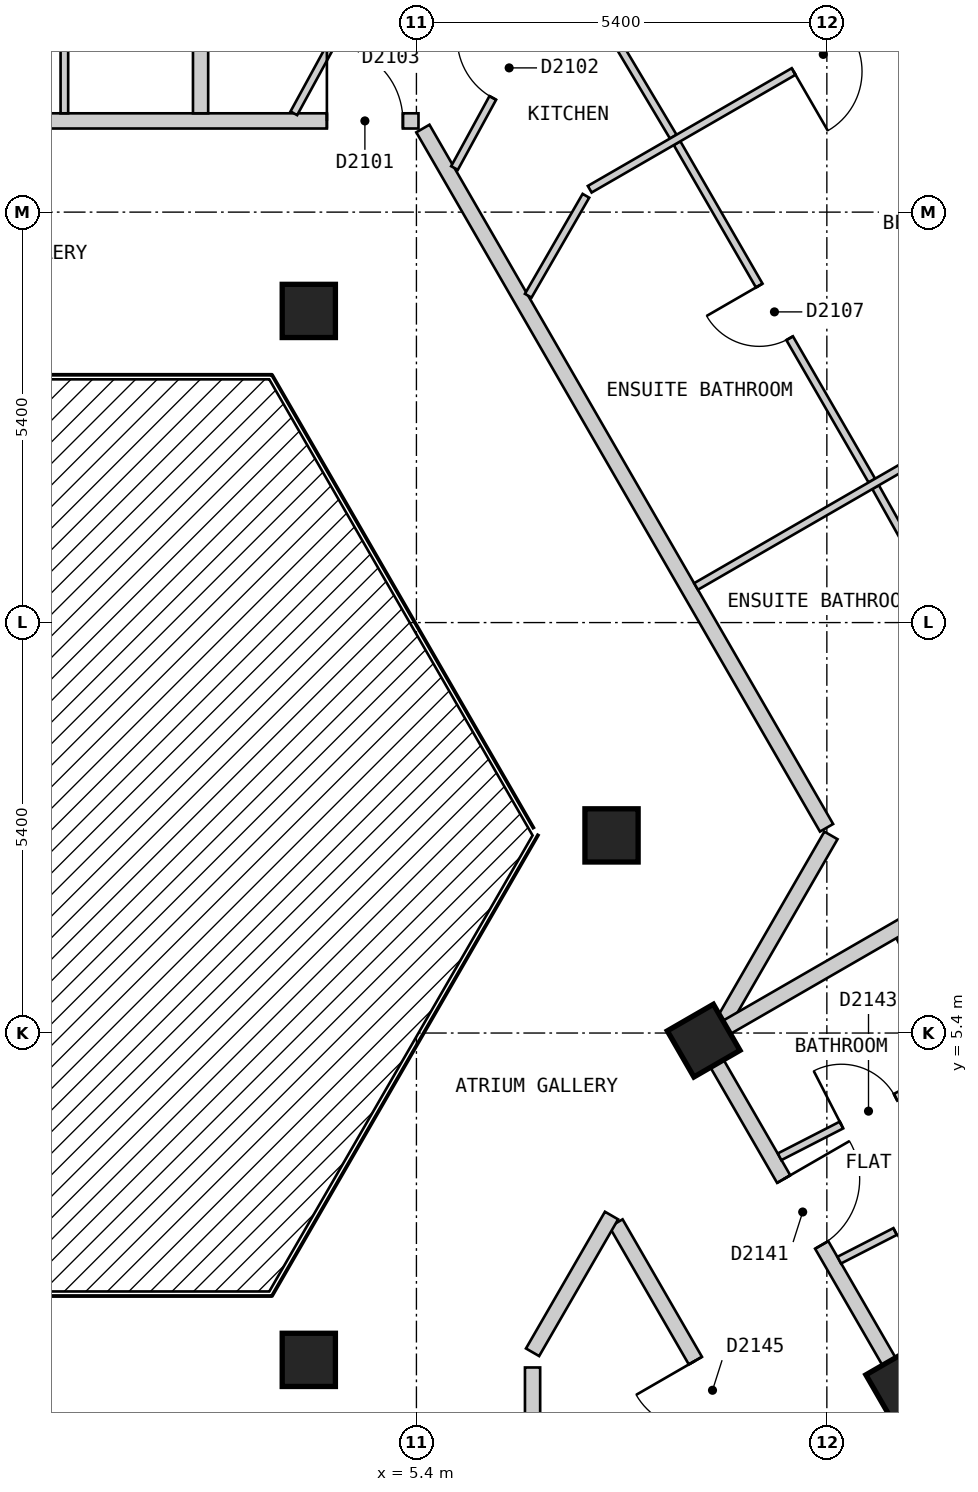
"""IFC4 building model, lengths in metres.
Left out: names, types, materials, properties, quantities, classifications, styles, units other than length and angle.
Written with IfcOpenShell. Run it as: python <this file> out.ifc"""

import sys

from ifc_helpers import new_model, si_unit, direction, frame, frame_2d, origin, origin_2d, place, context, subcontext, project, spatial, rectangle, extrude, element, fill, save


model = new_model("IFC4")
c1 = context("Model", 3, precision=1e-05, world=origin(), true_north=direction((0.0, 1.0)))
c2 = subcontext(c1, "Body", "Model", "MODEL_VIEW")
j1 = project(units=[si_unit("LENGTHUNIT", "METRE"), si_unit("PLANEANGLEUNIT", "RADIAN")], contexts=[c1])
p1 = place(None, origin())
s1 = spatial("IfcSite", under=j1, at=p1, CompositionType="ELEMENT")
p2 = place(p1, origin())
s2 = spatial("IfcBuilding", under=s1, at=p2, CompositionType="ELEMENT")
p3 = place(p2, frame((0.0, 0.0, 211.8)))
s3 = spatial("IfcBuildingStorey", under=s2, at=p3, CompositionType="ELEMENT", Elevation=211.8)
for number, where, z_axis, x_axis in (
    (1, (11.792, 0.775, 0.0), (0.0, 0.0, 1.0), (-0.5, 0.866, 0.0)),
    (2, (3.984, 1.1, 0.0), (0.0, 0.0, 1.0), (1.0, 0.0, 0.0)),
    (3, (9.179, 5.3, 0.0), (0.0, 0.0, 1.0), (-0.5, 0.866, 0.0)),
    (4, (7.967, 8.0, 0.0), (0.0, 0.0, 1.0), (1.0, 0.0, 0.0)),
    (5, (3.984, 14.9, 0.0), (0.0, 0.0, 1.0), (1.0, 0.0, 0.0)),
):
    element("IfcColumn", number, at=place(p3, frame(where, z_axis=z_axis, x_axis=x_axis)), inside=s3, PredefinedType="COLUMN", context=c2, shape_type="SweptSolid", body=[
        extrude(rectangle(XDim=0.7, YDim=0.7, at=origin_2d()), origin(), (0.0, 0.0, 1.0), 3.0),
    ])
p4 = place(p3, frame((8.026, 2.899, 0.0), z_axis=(0.0, 0.0, 1.0), x_axis=(0.499986018985, -0.866033475577, 0.0)))
e6 = element("IfcWall", 6, at=p4, inside=s3, PredefinedType="PARTITIONING", context=c2, shape_type="SweptSolid", body=[
    extrude(rectangle(XDim=5.078, YDim=0.2, at=frame_2d((2.539, 0.0))), origin(), (0.0, 0.0, 1.0), 2.7),
])
p5 = place(p4, frame((2.089, 0.0, 0.0)))
e7 = element("IfcOpeningElement", 7, at=p5, cuts=e6, PredefinedType="OPENING", context=c2, shape_type="SweptSolid", body=[
    extrude(rectangle(XDim=0.9, YDim=2.1, at=frame_2d((0.45, 1.05))), frame((0.0, 0.11, 0.0), z_axis=(0.0, -1.0, 0.0), x_axis=(1.0, 0.0, 0.0)), (0.0, 0.0, 1.0), 0.22),
])
p6 = place(p3, frame((9.238, 5.2, 0.0), z_axis=(0.0, 0.0, 1.0), x_axis=(0.500025705601, -0.86601056214, 0.0)))
e8 = element("IfcWall", 8, at=p6, inside=s3, PredefinedType="PARTITIONING", context=c2, shape_type="SweptSolid", body=[
    extrude(rectangle(XDim=7.735, YDim=0.2, at=frame_2d((3.868, 0.0))), origin(), (0.0, 0.0, 1.0), 2.7),
])
p7 = place(p6, frame((6.705, 0.0, 0.0)))
e9 = element("IfcOpeningElement", 9, at=p7, cuts=e8, PredefinedType="OPENING", context=c2, shape_type="SweptSolid", body=[
    extrude(rectangle(XDim=1.0, YDim=2.1, at=frame_2d((0.5, 1.05))), frame((0.0, 0.11, 0.0), z_axis=(0.0, -1.0, 0.0), x_axis=(1.0, 0.0, 0.0)), (0.0, 0.0, 1.0), 0.22),
])
p8 = place(p6, frame((1.988, 0.0, 0.0)))
e10 = element("IfcOpeningElement", 10, at=p8, cuts=e8, PredefinedType="OPENING", context=c2, shape_type="SweptSolid", body=[
    extrude(rectangle(XDim=1.0, YDim=2.1, at=frame_2d((0.5, 1.05))), frame((0.0, 0.11, 0.0), z_axis=(0.0, -1.0, 0.0), x_axis=(1.0, 0.0, 0.0)), (0.0, 0.0, 1.0), 0.22),
])
p9 = place(p3, frame((5.485, 17.3, 0.0), z_axis=(0.0, 0.0, 1.0), x_axis=(0.499943285704, -0.866058145322, 0.0)))
e11 = element("IfcWall", 11, at=p9, inside=s3, PredefinedType="PARTITIONING", context=c2, shape_type="SweptSolid", body=[
    extrude(rectangle(XDim=10.623, YDim=0.2, at=frame_2d((5.312, 0.0))), origin(), (0.0, 0.0, 1.0), 2.7),
])
p10 = place(p3, frame((6.928, 1.0, 0.0), z_axis=(0.0, 0.0, 1.0), x_axis=(0.0, -1.0, 0.0)))
e12 = element("IfcWall", 12, at=p10, inside=s3, PredefinedType="PARTITIONING", context=c2, shape_type="SweptSolid", body=[
    extrude(rectangle(XDim=3.699, YDim=0.2, at=frame_2d((1.85, 0.0))), origin(), (0.0, 0.0, 1.0), 2.7),
])
p11 = place(p3, frame((-5.312, 17.4, 0.0), z_axis=(0.0, 0.0, 1.0), x_axis=(1.0, 0.0, 0.0)))
e13 = element("IfcWall", 13, at=p11, inside=s3, PredefinedType="PARTITIONING", context=c2, shape_type="SweptSolid", body=[
    extrude(rectangle(XDim=10.739, YDim=0.2, at=frame_2d((5.37, 0.0))), origin(), (0.0, 0.0, 1.0), 2.7),
])
p12 = place(p11, frame((9.534, 0.0, 0.0)))
e14 = element("IfcOpeningElement", 14, at=p12, cuts=e13, PredefinedType="OPENING", context=c2, shape_type="SweptSolid", body=[
    extrude(rectangle(XDim=1.0, YDim=2.1, at=frame_2d((0.5, 1.05))), frame((0.0, 0.11, 0.0), z_axis=(0.0, -1.0, 0.0), x_axis=(1.0, 0.0, 0.0)), (0.0, 0.0, 1.0), 0.22),
])
p13 = place(p11, frame((4.812, 0.0, 0.0)))
e15 = element("IfcOpeningElement", 15, at=p13, cuts=e13, PredefinedType="OPENING", context=c2, shape_type="SweptSolid", body=[
    extrude(rectangle(XDim=1.0, YDim=2.1, at=frame_2d((0.5, 1.05))), frame((0.0, 0.11, 0.0), z_axis=(0.0, -1.0, 0.0), x_axis=(1.0, 0.0, 0.0)), (0.0, 0.0, 1.0), 0.22),
])
p14 = place(p3, frame((6.928, 1.2, 0.0), z_axis=(0.0, 0.0, 1.0), x_axis=(0.500132712588, 0.865948768577, 0.0)))
e16 = element("IfcWall", 16, at=p14, inside=s3, PredefinedType="PARTITIONING", context=c2, shape_type="SweptSolid", body=[
    extrude(rectangle(XDim=2.078, YDim=0.2, at=frame_2d((1.039, 0.0))), origin(), (0.0, 0.0, 1.0), 2.7),
])
p15 = place(p3, frame((9.454, 5.574, 0.0), z_axis=(0.0, 0.0, 1.0), x_axis=(0.499795394297, 0.86614350072, 0.0)))
e17 = element("IfcWall", 17, at=p15, inside=s3, PredefinedType="PARTITIONING", context=c2, shape_type="SweptSolid", body=[
    extrude(rectangle(XDim=2.801, YDim=0.2, at=frame_2d((1.4, 0.0))), origin(), (0.0, 0.0, 1.0), 2.7),
])
p16 = place(p3, frame((7.414, 19.484, 0.0), z_axis=(0.0, 0.0, 1.0), x_axis=(0.511881371655, -0.859056145634, 0.0)))
e18 = element("IfcWall", 18, at=p16, inside=s3, PredefinedType="PARTITIONING", context=c2, shape_type="SweptSolid", body=[
    extrude(rectangle(XDim=2.667, YDim=0.1, at=frame_2d((1.333, 0.0))), origin(), (0.0, 0.0, 1.0), 2.7),
])
p17 = place(p3, frame((8.829, 17.107, 0.0), z_axis=(0.0, 0.0, 1.0), x_axis=(0.500022055211, -0.866012669828, 0.0)))
e19 = element("IfcWall", 19, at=p17, inside=s3, PredefinedType="PARTITIONING", context=c2, shape_type="SweptSolid", body=[
    extrude(rectangle(XDim=5.126, YDim=0.1, at=frame_2d((2.563, 0.0))), origin(), (0.0, 0.0, 1.0), 2.7),
])
p18 = place(p17, frame((2.163, 0.0, 0.0)))
e20 = element("IfcOpeningElement", 20, at=p18, cuts=e19, PredefinedType="OPENING", context=c2, shape_type="SweptSolid", body=[
    extrude(rectangle(XDim=0.8, YDim=2.1, at=frame_2d((0.4, 1.05))), frame((0.0, 0.06, 0.0), z_axis=(0.0, -1.0, 0.0), x_axis=(1.0, 0.0, 0.0)), (0.0, 0.0, 1.0), 0.12),
])
p19 = place(p3, frame((11.441, 12.582, 0.0), z_axis=(0.0, 0.0, 1.0), x_axis=(0.488568218554, -0.872525699231, 0.0)))
e21 = element("IfcWall", 21, at=p19, inside=s3, PredefinedType="PARTITIONING", context=c2, shape_type="SweptSolid", body=[
    extrude(rectangle(XDim=5.076, YDim=0.1, at=frame_2d((2.538, 0.0))), origin(), (0.0, 0.0, 1.0), 2.7),
])
p20 = place(p19, frame((2.163, 0.0, 0.0)))
e22 = element("IfcOpeningElement", 22, at=p20, cuts=e21, PredefinedType="OPENING", context=c2, shape_type="SweptSolid", body=[
    extrude(rectangle(XDim=0.8, YDim=2.1, at=frame_2d((0.4, 1.05))), frame((0.0, 0.06, 0.0), z_axis=(0.0, -1.0, 0.0), x_axis=(1.0, 0.0, 0.0)), (0.0, 0.0, 1.0), 0.12),
])
p21 = place(p3, frame((11.772, 6.646, 0.0), z_axis=(0.0, 0.0, 1.0), x_axis=(0.456175983405, -0.889889584254, 0.0)))
e23 = element("IfcWall", 23, at=p21, inside=s3, PredefinedType="PARTITIONING", context=c2, shape_type="SweptSolid", body=[
    extrude(rectangle(XDim=3.348, YDim=0.1, at=frame_2d((1.674, 0.0))), origin(), (0.0, 0.0, 1.0), 2.7),
])
p22 = place(p3, frame((6.871, 15.1, 0.0), z_axis=(0.0, 0.0, 1.0), x_axis=(0.499805980977, 0.866137391745, 0.0)))
e24 = element("IfcWall", 24, at=p22, inside=s3, PredefinedType="PARTITIONING", context=c2, shape_type="SweptSolid", body=[
    extrude(rectangle(XDim=1.518, YDim=0.1, at=frame_2d((0.759, 0.0))), origin(), (0.0, 0.0, 1.0), 2.7),
])
p23 = place(p3, frame((3.787, 17.5, 0.0), z_axis=(0.0, 0.0, 1.0), x_axis=(0.479146828267, 0.877734764585, 0.0)))
e25 = element("IfcWall", 25, at=p23, inside=s3, PredefinedType="PARTITIONING", context=c2, shape_type="SweptSolid", body=[
    extrude(rectangle(XDim=3.076, YDim=0.1, at=frame_2d((1.538, 0.0))), origin(), (0.0, 0.0, 1.0), 2.7),
])
p24 = place(p23, frame((1.081, 0.0, 0.0)))
e26 = element("IfcOpeningElement", 26, at=p24, cuts=e25, PredefinedType="OPENING", context=c2, shape_type="SweptSolid", body=[
    extrude(rectangle(XDim=0.8, YDim=2.1, at=frame_2d((0.4, 1.05))), frame((0.0, 0.06, 0.0), z_axis=(0.0, -1.0, 0.0), x_axis=(1.0, 0.0, 0.0)), (0.0, 0.0, 1.0), 0.12),
])
p25 = place(p3, frame((5.901, 16.78, 0.0), z_axis=(0.0, 0.0, 1.0), x_axis=(0.479148317257, 0.877733951759, 0.0)))
e27 = element("IfcWall", 27, at=p25, inside=s3, PredefinedType="PARTITIONING", context=c2, shape_type="SweptSolid", body=[
    extrude(rectangle(XDim=3.118, YDim=0.1, at=frame_2d((1.559, 0.0))), origin(), (0.0, 0.0, 1.0), 2.7),
])
p26 = place(p25, frame((1.051, 0.0, 0.0)))
e28 = element("IfcOpeningElement", 28, at=p26, cuts=e27, PredefinedType="OPENING", context=c2, shape_type="SweptSolid", body=[
    extrude(rectangle(XDim=0.9, YDim=2.1, at=frame_2d((0.45, 1.05))), frame((0.0, 0.06, 0.0), z_axis=(0.0, -1.0, 0.0), x_axis=(1.0, 0.0, 0.0)), (0.0, 0.0, 1.0), 0.12),
])
p27 = place(p3, frame((0.768, 17.5, 0.0), z_axis=(0.0, 0.0, 1.0), x_axis=(0.0, 1.0, 0.0)))
e29 = element("IfcWall", 29, at=p27, inside=s3, PredefinedType="PARTITIONING", context=c2, shape_type="SweptSolid", body=[
    extrude(rectangle(XDim=2.51, YDim=0.1, at=frame_2d((1.255, 0.0))), origin(), (0.0, 0.0, 1.0), 2.7),
])
p28 = place(p27, frame((0.83, 0.0, 0.0)))
e30 = element("IfcOpeningElement", 30, at=p28, cuts=e29, PredefinedType="OPENING", context=c2, shape_type="SweptSolid", body=[
    extrude(rectangle(XDim=0.8, YDim=2.1, at=frame_2d((0.4, 1.05))), frame((0.0, 0.06, 0.0), z_axis=(0.0, -1.0, 0.0), x_axis=(1.0, 0.0, 0.0)), (0.0, 0.0, 1.0), 0.12),
])
p29 = place(p3, frame((10.178, 3.772, 0.0), z_axis=(0.0, 0.0, 1.0), x_axis=(0.889732071959, 0.456483121405, 0.0)))
e31 = element("IfcWall", 31, at=p29, inside=s3, PredefinedType="PARTITIONING", context=c2, shape_type="SweptSolid", body=[
    extrude(rectangle(XDim=2.679, YDim=0.1, at=frame_2d((1.34, 0.0))), origin(), (0.0, 0.0, 1.0), 2.7),
])
p30 = place(p29, frame((0.915, 0.0, 0.0)))
e32 = element("IfcOpeningElement", 32, at=p30, cuts=e31, PredefinedType="OPENING", context=c2, shape_type="SweptSolid", body=[
    extrude(rectangle(XDim=0.8, YDim=2.1, at=frame_2d((0.4, 1.05))), frame((0.0, 0.06, 0.0), z_axis=(0.0, -1.0, 0.0), x_axis=(1.0, 0.0, 0.0)), (0.0, 0.0, 1.0), 0.12),
])
p31 = place(p3, frame((10.963, 2.412, 0.0), z_axis=(0.0, 0.0, 1.0), x_axis=(0.889943997558, 0.456069820543, 0.0)))
e33 = element("IfcWall", 33, at=p31, inside=s3, PredefinedType="PARTITIONING", context=c2, shape_type="SweptSolid", body=[
    extrude(rectangle(XDim=2.651, YDim=0.1, at=frame_2d((1.325, 0.0))), origin(), (0.0, 0.0, 1.0), 2.7),
])
p32 = place(p31, frame((0.826, 0.0, 0.0)))
e34 = element("IfcOpeningElement", 34, at=p32, cuts=e33, PredefinedType="OPENING", context=c2, shape_type="SweptSolid", body=[
    extrude(rectangle(XDim=0.9, YDim=2.1, at=frame_2d((0.45, 1.05))), frame((0.0, 0.06, 0.0), z_axis=(0.0, -1.0, 0.0), x_axis=(1.0, 0.0, 0.0)), (0.0, 0.0, 1.0), 0.12),
])
p33 = place(p3, frame((9.079, 11.275, 0.0), z_axis=(0.0, 0.0, 1.0), x_axis=(0.866001485781, 0.500041424909, 0.0)))
e35 = element("IfcWall", 35, at=p33, inside=s3, PredefinedType="PARTITIONING", context=c2, shape_type="SweptSolid", body=[
    extrude(rectangle(XDim=7.2, YDim=0.1, at=frame_2d((3.6, 0.0))), origin(), (0.0, 0.0, 1.0), 2.7),
])
p34 = place(p33, frame((4.5, 0.0, 0.0)))
e36 = element("IfcOpeningElement", 36, at=p34, cuts=e35, PredefinedType="OPENING", context=c2, shape_type="SweptSolid", body=[
    extrude(rectangle(XDim=0.9, YDim=2.1, at=frame_2d((0.45, 1.05))), frame((0.0, 0.06, 0.0), z_axis=(0.0, -1.0, 0.0), x_axis=(1.0, 0.0, 0.0)), (0.0, 0.0, 1.0), 0.12),
])
p35 = place(p3, frame((7.68, 16.501, 0.0), z_axis=(0.0, 0.0, 1.0), x_axis=(0.86602149507, 0.500006770031, 0.0)))
e37 = element("IfcWall", 37, at=p35, inside=s3, PredefinedType="PARTITIONING", context=c2, shape_type="SweptSolid", body=[
    extrude(rectangle(XDim=5.798, YDim=0.1, at=frame_2d((2.899, 0.0))), origin(), (0.0, 0.0, 1.0), 2.7),
])
p36 = place(p35, frame((3.098, 0.0, 0.0)))
e38 = element("IfcOpeningElement", 38, at=p36, cuts=e37, PredefinedType="OPENING", context=c2, shape_type="SweptSolid", body=[
    extrude(rectangle(XDim=0.9, YDim=2.1, at=frame_2d((0.45, 1.05))), frame((0.0, 0.06, 0.0), z_axis=(0.0, -1.0, 0.0), x_axis=(1.0, 0.0, 0.0)), (0.0, 0.0, 1.0), 0.12),
])
p37 = place(p3, frame((2.56, 20.08, 0.0), z_axis=(0.0, 0.0, 1.0), x_axis=(0.0, -1.0, 0.0)))
e39 = element("IfcWall", 39, at=p37, inside=s3, PredefinedType="PARTITIONING", context=c2, shape_type="SweptSolid", body=[
    extrude(rectangle(XDim=2.58, YDim=0.2, at=frame_2d((1.29, 0.0))), origin(), (0.0, 0.0, 1.0), 2.7),
])
p38 = place(p3, frame((9.354, 5.401, 0.0), z_axis=(0.0, 0.0, 1.0), x_axis=(0.866018411306, 0.500012111133, 0.0)))
e40 = element("IfcWall", 40, at=p38, inside=s3, PredefinedType="PARTITIONING", context=c2, shape_type="SweptSolid", body=[
    extrude(rectangle(XDim=9.898, YDim=0.2, at=frame_2d((4.949, 0.0))), origin(), (0.0, 0.0, 1.0), 2.7),
])
p39 = place(p12, origin())
e41 = element("IfcDoor", 41, at=p39, inside=s3, OperationType="SINGLE_SWING_LEFT", PredefinedType="DOOR", context=c2, shape_type="SweptSolid", body=[
    extrude(rectangle(XDim=1.0, YDim=2.1, at=frame_2d((0.5, 1.05))), frame((0.0, 0.025, 0.0), z_axis=(0.0, -1.0, 0.0), x_axis=(1.0, 0.0, 0.0)), (0.0, 0.0, 1.0), 0.05),
])
fill(e14, e41)
p40 = place(p26, origin())
e42 = element("IfcDoor", 42, at=p40, inside=s3, OperationType="SINGLE_SWING_RIGHT", PredefinedType="DOOR", context=c2, shape_type="SweptSolid", body=[
    extrude(rectangle(XDim=0.9, YDim=2.1, at=frame_2d((0.45, 1.05))), frame((0.0, 0.025, 0.0), z_axis=(0.0, -1.0, 0.0), x_axis=(1.0, 0.0, 0.0)), (0.0, 0.0, 1.0), 0.05),
])
fill(e28, e42)
p41 = place(p36, origin())
e43 = element("IfcDoor", 43, at=p41, inside=s3, OperationType="SINGLE_SWING_LEFT", PredefinedType="DOOR", context=c2, shape_type="SweptSolid", body=[
    extrude(rectangle(XDim=0.9, YDim=2.1, at=frame_2d((0.45, 1.05))), frame((0.0, 0.025, 0.0), z_axis=(0.0, -1.0, 0.0), x_axis=(1.0, 0.0, 0.0)), (0.0, 0.0, 1.0), 0.05),
])
fill(e38, e43)
p42 = place(p18, origin())
e44 = element("IfcDoor", 44, at=p42, inside=s3, OperationType="SINGLE_SWING_LEFT", PredefinedType="DOOR", context=c2, shape_type="SweptSolid", body=[
    extrude(rectangle(XDim=0.8, YDim=2.1, at=frame_2d((0.4, 1.05))), frame((0.0, 0.025, 0.0), z_axis=(0.0, -1.0, 0.0), x_axis=(1.0, 0.0, 0.0)), (0.0, 0.0, 1.0), 0.05),
])
fill(e20, e44)
p43 = place(p8, origin())
e45 = element("IfcDoor", 45, at=p43, inside=s3, OperationType="SINGLE_SWING_LEFT", PredefinedType="DOOR", context=c2, shape_type="SweptSolid", body=[
    extrude(rectangle(XDim=1.0, YDim=2.1, at=frame_2d((0.5, 1.05))), frame((0.0, 0.025, 0.0), z_axis=(0.0, -1.0, 0.0), x_axis=(1.0, 0.0, 0.0)), (0.0, 0.0, 1.0), 0.05),
])
fill(e10, e45)
p44 = place(p32, origin())
e46 = element("IfcDoor", 46, at=p44, inside=s3, OperationType="SINGLE_SWING_RIGHT", PredefinedType="DOOR", context=c2, shape_type="SweptSolid", body=[
    extrude(rectangle(XDim=0.9, YDim=2.1, at=frame_2d((0.45, 1.05))), frame((0.0, 0.025, 0.0), z_axis=(0.0, -1.0, 0.0), x_axis=(1.0, 0.0, 0.0)), (0.0, 0.0, 1.0), 0.05),
])
fill(e34, e46)
p45 = place(p30, origin())
e47 = element("IfcDoor", 47, at=p45, inside=s3, OperationType="SINGLE_SWING_LEFT", PredefinedType="DOOR", context=c2, shape_type="SweptSolid", body=[
    extrude(rectangle(XDim=0.8, YDim=2.1, at=frame_2d((0.4, 1.05))), frame((0.0, 0.025, 0.0), z_axis=(0.0, -1.0, 0.0), x_axis=(1.0, 0.0, 0.0)), (0.0, 0.0, 1.0), 0.05),
])
fill(e32, e47)
p46 = place(p5, origin())
e48 = element("IfcDoor", 48, at=p46, inside=s3, OperationType="SINGLE_SWING_LEFT", PredefinedType="DOOR", context=c2, shape_type="SweptSolid", body=[
    extrude(rectangle(XDim=0.9, YDim=2.1, at=frame_2d((0.45, 1.05))), frame((0.0, 0.025, 0.0), z_axis=(0.0, -1.0, 0.0), x_axis=(1.0, 0.0, 0.0)), (0.0, 0.0, 1.0), 0.05),
])
fill(e7, e48)
save(model, sys.argv[1])
